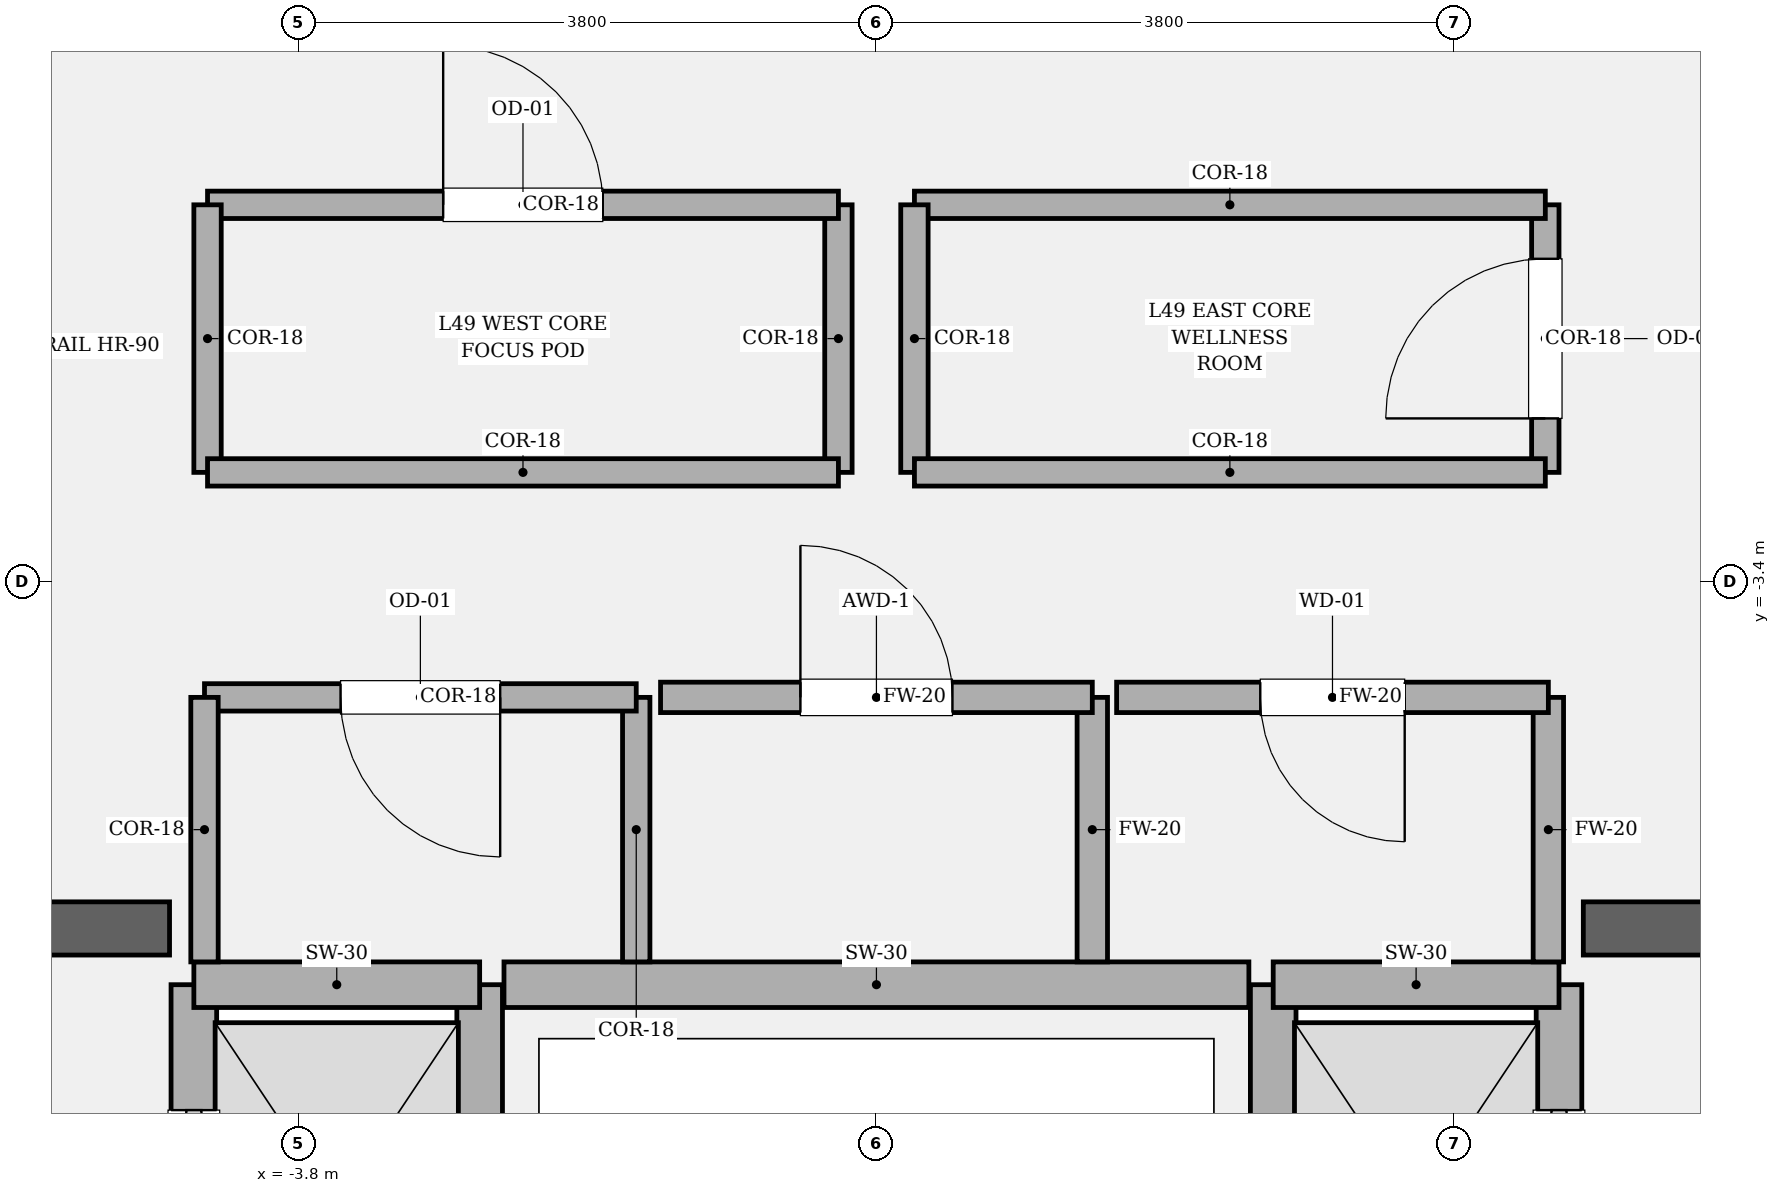
"""IFC4 building model, lengths in metres.
Left out: names, types, materials, properties, quantities, classifications, styles, units other than length and angle.
Written with IfcOpenShell. Run it as: python <this file> out.ifc"""

import sys

from ifc_helpers import new_model, si_unit, direction, frame, frame_2d, origin, place, context, subcontext, project, spatial, rectangle, extrude, element, fill, save


model = new_model("IFC4")
c1 = context("Model", 3, precision=1e-05, world=origin(), true_north=direction((0.0, 1.0)))
c2 = subcontext(c1, "Body", "Model", "MODEL_VIEW")
j1 = project(units=[si_unit("LENGTHUNIT", "METRE"), si_unit("PLANEANGLEUNIT", "RADIAN")], contexts=[c1])
p1 = place(None, origin())
s1 = spatial("IfcSite", under=j1, at=p1, CompositionType="ELEMENT")
p2 = place(p1, origin())
s2 = spatial("IfcBuilding", under=s1, at=p2, CompositionType="ELEMENT")
p3 = place(p2, frame((0.0, 0.0, 208.65)))
s3 = spatial("IfcBuildingStorey", under=s2, at=p3, CompositionType="ELEMENT", Elevation=208.65)
p4 = place(p3, frame((-9.875, -5.68, 0.0), z_axis=(0.0, 0.0, 1.0), x_axis=(1.0, 0.0, 0.0)))
e1 = element("IfcWall", 1, at=p4, inside=s3, PredefinedType="SOLIDWALL", context=c2, shape_type="SweptSolid", body=[
    extrude(rectangle(XDim=5.225, YDim=0.35, at=frame_2d((2.613, 0.0))), origin(), (0.0, 0.0, 1.0), 4.05),
])
p5 = place(p4, frame((1.335, 0.0, 0.0)))
e2 = element("IfcOpeningElement", 2, at=p5, cuts=e1, PredefinedType="OPENING", context=c2, shape_type="SweptSolid", body=[
    extrude(rectangle(XDim=1.18, YDim=2.2, at=frame_2d((0.59, 1.1))), frame((0.0, 0.185, 0.0), z_axis=(0.0, -1.0, 0.0), x_axis=(1.0, 0.0, 0.0)), (0.0, 0.0, 1.0), 0.37),
])
p6 = place(p3, frame((4.65, -5.68, 0.0), z_axis=(0.0, 0.0, 1.0), x_axis=(1.0, 0.0, 0.0)))
e3 = element("IfcWall", 3, at=p6, inside=s3, PredefinedType="SOLIDWALL", context=c2, shape_type="SweptSolid", body=[
    extrude(rectangle(XDim=5.225, YDim=0.35, at=frame_2d((2.613, 0.0))), origin(), (0.0, 0.0, 1.0), 4.05),
])
p7 = place(p6, frame((2.71, 0.0, 0.0)))
e4 = element("IfcOpeningElement", 4, at=p7, cuts=e3, PredefinedType="OPENING", context=c2, shape_type="SweptSolid", body=[
    extrude(rectangle(XDim=1.18, YDim=2.2, at=frame_2d((0.59, 1.1))), frame((0.0, 0.185, 0.0), z_axis=(0.0, -1.0, 0.0), x_axis=(1.0, 0.0, 0.0)), (0.0, 0.0, 1.0), 0.37),
])
p8 = place(p3, frame((-4.49, -8.82, 0.0), z_axis=(0.0, 0.0, 1.0), x_axis=(0.0, 1.0, 0.0)))
e5 = element("IfcWall", 5, at=p8, inside=s3, PredefinedType="SOLIDWALL", context=c2, shape_type="SweptSolid", body=[
    extrude(rectangle(XDim=2.77, YDim=0.3, at=frame_2d((1.385, 0.0))), origin(), (0.0, 0.0, 1.0), 3.83),
])
p9 = place(p8, frame((0.825, 0.0, 0.0)))
e6 = element("IfcOpeningElement", 6, at=p9, cuts=e5, PredefinedType="OPENING", context=c2, shape_type="SweptSolid", body=[
    extrude(rectangle(XDim=1.12, YDim=2.25, at=frame_2d((0.56, 1.125))), frame((0.0, 0.16, 0.0), z_axis=(0.0, -1.0, 0.0), x_axis=(1.0, 0.0, 0.0)), (0.0, 0.0, 1.0), 0.32),
])
p10 = place(p3, frame((-2.61, -8.82, 0.0), z_axis=(0.0, 0.0, 1.0), x_axis=(0.0, 1.0, 0.0)))
e7 = element("IfcWall", 7, at=p10, inside=s3, PredefinedType="SOLIDWALL", context=c2, shape_type="SweptSolid", body=[
    extrude(rectangle(XDim=2.77, YDim=0.3, at=frame_2d((1.385, 0.0))), origin(), (0.0, 0.0, 1.0), 3.83),
])
p11 = place(p3, frame((-4.49, -6.05, 0.0), z_axis=(0.0, 0.0, 1.0), x_axis=(1.0, 0.0, 0.0)))
e8 = element("IfcWall", 8, at=p11, inside=s3, PredefinedType="SOLIDWALL", context=c2, shape_type="SweptSolid", body=[
    extrude(rectangle(XDim=1.88, YDim=0.3, at=frame_2d((0.94, 0.0))), origin(), (0.0, 0.0, 1.0), 3.83),
])
p12 = place(p3, frame((4.49, -8.82, 0.0), z_axis=(0.0, 0.0, 1.0), x_axis=(0.0, 1.0, 0.0)))
e9 = element("IfcWall", 9, at=p12, inside=s3, PredefinedType="SOLIDWALL", context=c2, shape_type="SweptSolid", body=[
    extrude(rectangle(XDim=2.77, YDim=0.3, at=frame_2d((1.385, 0.0))), origin(), (0.0, 0.0, 1.0), 3.83),
])
p13 = place(p12, frame((0.825, 0.0, 0.0)))
e10 = element("IfcOpeningElement", 10, at=p13, cuts=e9, PredefinedType="OPENING", context=c2, shape_type="SweptSolid", body=[
    extrude(rectangle(XDim=1.12, YDim=2.25, at=frame_2d((0.56, 1.125))), frame((0.0, 0.16, 0.0), z_axis=(0.0, -1.0, 0.0), x_axis=(1.0, 0.0, 0.0)), (0.0, 0.0, 1.0), 0.32),
])
p14 = place(p3, frame((2.61, -8.82, 0.0), z_axis=(0.0, 0.0, 1.0), x_axis=(0.0, 1.0, 0.0)))
e11 = element("IfcWall", 11, at=p14, inside=s3, PredefinedType="SOLIDWALL", context=c2, shape_type="SweptSolid", body=[
    extrude(rectangle(XDim=2.77, YDim=0.3, at=frame_2d((1.385, 0.0))), origin(), (0.0, 0.0, 1.0), 3.83),
])
p15 = place(p3, frame((2.61, -6.05, 0.0), z_axis=(0.0, 0.0, 1.0), x_axis=(1.0, 0.0, 0.0)))
e12 = element("IfcWall", 12, at=p15, inside=s3, PredefinedType="SOLIDWALL", context=c2, shape_type="SweptSolid", body=[
    extrude(rectangle(XDim=1.88, YDim=0.3, at=frame_2d((0.94, 0.0))), origin(), (0.0, 0.0, 1.0), 3.83),
])
p16 = place(p3, frame((-2.45, -6.05, 0.0), z_axis=(0.0, 0.0, 1.0), x_axis=(1.0, 0.0, 0.0)))
e13 = element("IfcWall", 13, at=p16, inside=s3, PredefinedType="SOLIDWALL", context=c2, shape_type="SweptSolid", body=[
    extrude(rectangle(XDim=4.9, YDim=0.3, at=frame_2d((2.45, 0.0))), origin(), (0.0, 0.0, 1.0), 3.83),
])
p17 = place(p3, frame((-1.58, -5.9, 0.0), z_axis=(0.0, 0.0, 1.0), x_axis=(0.0, 1.0, 0.0)))
e14 = element("IfcWall", 14, at=p17, inside=s3, PredefinedType="PARTITIONING", context=c2, shape_type="SweptSolid", body=[
    extrude(rectangle(XDim=1.74, YDim=0.18, at=frame_2d((0.87, 0.0))), origin(), (0.0, 0.0, 1.0), 3.83),
])
p18 = place(p3, frame((-1.58, -4.16, 0.0), z_axis=(0.0, 0.0, 1.0), x_axis=(-1.0, 0.0, 0.0)))
e15 = element("IfcWall", 15, at=p18, inside=s3, PredefinedType="PARTITIONING", context=c2, shape_type="SweptSolid", body=[
    extrude(rectangle(XDim=2.84, YDim=0.18, at=frame_2d((1.42, 0.0))), origin(), (0.0, 0.0, 1.0), 3.83),
])
p19 = place(p18, frame((0.895, 0.0, 0.0)))
e16 = element("IfcOpeningElement", 16, at=p19, cuts=e15, PredefinedType="OPENING", context=c2, shape_type="SweptSolid", body=[
    extrude(rectangle(XDim=1.05, YDim=2.2, at=frame_2d((0.525, 1.1))), frame((0.0, 0.1, 0.0), z_axis=(0.0, -1.0, 0.0), x_axis=(1.0, 0.0, 0.0)), (0.0, 0.0, 1.0), 0.2),
])
p20 = place(p3, frame((-4.42, -4.16, 0.0), z_axis=(0.0, 0.0, 1.0), x_axis=(0.0, -1.0, 0.0)))
e17 = element("IfcWall", 17, at=p20, inside=s3, PredefinedType="PARTITIONING", context=c2, shape_type="SweptSolid", body=[
    extrude(rectangle(XDim=1.74, YDim=0.18, at=frame_2d((0.87, 0.0))), origin(), (0.0, 0.0, 1.0), 3.83),
])
p21 = place(p3, frame((1.42, -5.9, 0.0), z_axis=(0.0, 0.0, 1.0), x_axis=(0.0, 1.0, 0.0)))
e18 = element("IfcWall", 18, at=p21, inside=s3, PredefinedType="SOLIDWALL", context=c2, shape_type="SweptSolid", body=[
    extrude(rectangle(XDim=1.74, YDim=0.2, at=frame_2d((0.87, 0.0))), origin(), (0.0, 0.0, 1.0), 3.83),
])
p22 = place(p3, frame((1.42, -4.16, 0.0), z_axis=(0.0, 0.0, 1.0), x_axis=(-1.0, 0.0, 0.0)))
e19 = element("IfcWall", 19, at=p22, inside=s3, PredefinedType="SOLIDWALL", context=c2, shape_type="SweptSolid", body=[
    extrude(rectangle(XDim=2.84, YDim=0.2, at=frame_2d((1.42, 0.0))), origin(), (0.0, 0.0, 1.0), 3.83),
])
p23 = place(p22, frame((0.92, 0.0, 0.0)))
e20 = element("IfcOpeningElement", 20, at=p23, cuts=e19, PredefinedType="OPENING", context=c2, shape_type="SweptSolid", body=[
    extrude(rectangle(XDim=1.0, YDim=2.15, at=frame_2d((0.5, 1.075))), frame((0.0, 0.11, 0.0), z_axis=(0.0, -1.0, 0.0), x_axis=(1.0, 0.0, 0.0)), (0.0, 0.0, 1.0), 0.22),
])
p24 = place(p3, frame((4.42, -5.9, 0.0), z_axis=(0.0, 0.0, 1.0), x_axis=(0.0, 1.0, 0.0)))
e21 = element("IfcWall", 21, at=p24, inside=s3, PredefinedType="SOLIDWALL", context=c2, shape_type="SweptSolid", body=[
    extrude(rectangle(XDim=1.74, YDim=0.2, at=frame_2d((0.87, 0.0))), origin(), (0.0, 0.0, 1.0), 3.83),
])
p25 = place(p3, frame((4.42, -4.16, 0.0), z_axis=(0.0, 0.0, 1.0), x_axis=(-1.0, 0.0, 0.0)))
e22 = element("IfcWall", 22, at=p25, inside=s3, PredefinedType="SOLIDWALL", context=c2, shape_type="SweptSolid", body=[
    extrude(rectangle(XDim=2.84, YDim=0.2, at=frame_2d((1.42, 0.0))), origin(), (0.0, 0.0, 1.0), 3.83),
])
p26 = place(p25, frame((0.945, 0.0, 0.0)))
e23 = element("IfcOpeningElement", 23, at=p26, cuts=e22, PredefinedType="OPENING", context=c2, shape_type="SweptSolid", body=[
    extrude(rectangle(XDim=0.95, YDim=2.15, at=frame_2d((0.475, 1.075))), frame((0.0, 0.11, 0.0), z_axis=(0.0, -1.0, 0.0), x_axis=(1.0, 0.0, 0.0)), (0.0, 0.0, 1.0), 0.22),
])
p27 = place(p3, frame((-0.25, -2.68, 0.0), z_axis=(0.0, 0.0, 1.0), x_axis=(0.0, 1.0, 0.0)))
e24 = element("IfcWall", 24, at=p27, inside=s3, PredefinedType="PARTITIONING", context=c2, shape_type="SweptSolid", body=[
    extrude(rectangle(XDim=1.76, YDim=0.18, at=frame_2d((0.88, 0.0))), origin(), (0.0, 0.0, 1.0), 3.83),
])
p28 = place(p3, frame((-0.25, -0.92, 0.0), z_axis=(0.0, 0.0, 1.0), x_axis=(-1.0, 0.0, 0.0)))
e25 = element("IfcWall", 25, at=p28, inside=s3, PredefinedType="PARTITIONING", context=c2, shape_type="SweptSolid", body=[
    extrude(rectangle(XDim=4.15, YDim=0.18, at=frame_2d((2.075, 0.0))), origin(), (0.0, 0.0, 1.0), 3.83),
])
p29 = place(p28, frame((1.55, 0.0, 0.0)))
e26 = element("IfcOpeningElement", 26, at=p29, cuts=e25, PredefinedType="OPENING", context=c2, shape_type="SweptSolid", body=[
    extrude(rectangle(XDim=1.05, YDim=2.2, at=frame_2d((0.525, 1.1))), frame((0.0, 0.1, 0.0), z_axis=(0.0, -1.0, 0.0), x_axis=(1.0, 0.0, 0.0)), (0.0, 0.0, 1.0), 0.2),
])
p30 = place(p3, frame((-4.4, -0.92, 0.0), z_axis=(0.0, 0.0, 1.0), x_axis=(0.0, -1.0, 0.0)))
e27 = element("IfcWall", 27, at=p30, inside=s3, PredefinedType="PARTITIONING", context=c2, shape_type="SweptSolid", body=[
    extrude(rectangle(XDim=1.76, YDim=0.18, at=frame_2d((0.88, 0.0))), origin(), (0.0, 0.0, 1.0), 3.83),
])
p31 = place(p3, frame((-4.4, -2.68, 0.0), z_axis=(0.0, 0.0, 1.0), x_axis=(1.0, 0.0, 0.0)))
e28 = element("IfcWall", 28, at=p31, inside=s3, PredefinedType="PARTITIONING", context=c2, shape_type="SweptSolid", body=[
    extrude(rectangle(XDim=4.15, YDim=0.18, at=frame_2d((2.075, 0.0))), origin(), (0.0, 0.0, 1.0), 3.83),
])
p32 = place(p3, frame((4.4, -2.68, 0.0), z_axis=(0.0, 0.0, 1.0), x_axis=(0.0, 1.0, 0.0)))
e29 = element("IfcWall", 29, at=p32, inside=s3, PredefinedType="PARTITIONING", context=c2, shape_type="SweptSolid", body=[
    extrude(rectangle(XDim=1.76, YDim=0.18, at=frame_2d((0.88, 0.0))), origin(), (0.0, 0.0, 1.0), 3.83),
])
p33 = place(p32, frame((0.355, 0.0, 0.0)))
e30 = element("IfcOpeningElement", 30, at=p33, cuts=e29, PredefinedType="OPENING", context=c2, shape_type="SweptSolid", body=[
    extrude(rectangle(XDim=1.05, YDim=2.2, at=frame_2d((0.525, 1.1))), frame((0.0, 0.1, 0.0), z_axis=(0.0, -1.0, 0.0), x_axis=(1.0, 0.0, 0.0)), (0.0, 0.0, 1.0), 0.2),
])
p34 = place(p3, frame((4.4, -0.92, 0.0), z_axis=(0.0, 0.0, 1.0), x_axis=(-1.0, 0.0, 0.0)))
e31 = element("IfcWall", 31, at=p34, inside=s3, PredefinedType="PARTITIONING", context=c2, shape_type="SweptSolid", body=[
    extrude(rectangle(XDim=4.15, YDim=0.18, at=frame_2d((2.075, 0.0))), origin(), (0.0, 0.0, 1.0), 3.83),
])
p35 = place(p3, frame((0.25, -0.92, 0.0), z_axis=(0.0, 0.0, 1.0), x_axis=(0.0, -1.0, 0.0)))
e32 = element("IfcWall", 32, at=p35, inside=s3, PredefinedType="PARTITIONING", context=c2, shape_type="SweptSolid", body=[
    extrude(rectangle(XDim=1.76, YDim=0.18, at=frame_2d((0.88, 0.0))), origin(), (0.0, 0.0, 1.0), 3.83),
])
p36 = place(p3, frame((0.25, -2.68, 0.0), z_axis=(0.0, 0.0, 1.0), x_axis=(1.0, 0.0, 0.0)))
e33 = element("IfcWall", 33, at=p36, inside=s3, PredefinedType="PARTITIONING", context=c2, shape_type="SweptSolid", body=[
    extrude(rectangle(XDim=4.15, YDim=0.18, at=frame_2d((2.075, 0.0))), origin(), (0.0, 0.0, 1.0), 3.83),
])
p37 = place(p9, origin())
e34 = element("IfcDoor", 34, at=p37, inside=s3, OperationType="SLIDING_TO_LEFT", PredefinedType="DOOR", context=c2, shape_type="SweptSolid", body=[
    extrude(rectangle(XDim=1.12, YDim=2.25, at=frame_2d((0.56, 1.125))), frame((0.0, 0.025, 0.0), z_axis=(0.0, -1.0, 0.0), x_axis=(1.0, 0.0, 0.0)), (0.0, 0.0, 1.0), 0.05),
])
fill(e6, e34)
p38 = place(p13, origin())
e35 = element("IfcDoor", 35, at=p38, inside=s3, OperationType="SLIDING_TO_RIGHT", PredefinedType="DOOR", context=c2, shape_type="SweptSolid", body=[
    extrude(rectangle(XDim=1.12, YDim=2.25, at=frame_2d((0.56, 1.125))), frame((0.0, 0.025, 0.0), z_axis=(0.0, -1.0, 0.0), x_axis=(1.0, 0.0, 0.0)), (0.0, 0.0, 1.0), 0.05),
])
fill(e10, e35)
p39 = place(p19, origin())
e36 = element("IfcDoor", 36, at=p39, inside=s3, OperationType="SINGLE_SWING_LEFT", PredefinedType="DOOR", context=c2, shape_type="SweptSolid", body=[
    extrude(rectangle(XDim=1.05, YDim=2.2, at=frame_2d((0.525, 1.1))), frame((0.0, 0.025, 0.0), z_axis=(0.0, -1.0, 0.0), x_axis=(1.0, 0.0, 0.0)), (0.0, 0.0, 1.0), 0.05),
])
fill(e16, e36)
p40 = place(p23, origin())
e37 = element("IfcDoor", 37, at=p40, inside=s3, OperationType="SINGLE_SWING_RIGHT", PredefinedType="DOOR", context=c2, shape_type="SweptSolid", body=[
    extrude(rectangle(XDim=1.0, YDim=2.15, at=frame_2d((0.5, 1.075))), frame((0.0, 0.025, 0.0), z_axis=(0.0, -1.0, 0.0), x_axis=(1.0, 0.0, 0.0)), (0.0, 0.0, 1.0), 0.05),
])
fill(e20, e37)
p41 = place(p26, origin())
e38 = element("IfcDoor", 38, at=p41, inside=s3, OperationType="SINGLE_SWING_LEFT", PredefinedType="DOOR", context=c2, shape_type="SweptSolid", body=[
    extrude(rectangle(XDim=0.95, YDim=2.15, at=frame_2d((0.475, 1.075))), frame((0.0, 0.025, 0.0), z_axis=(0.0, -1.0, 0.0), x_axis=(1.0, 0.0, 0.0)), (0.0, 0.0, 1.0), 0.05),
])
fill(e23, e38)
p42 = place(p29, origin())
e39 = element("IfcDoor", 39, at=p42, inside=s3, OperationType="SINGLE_SWING_RIGHT", PredefinedType="DOOR", context=c2, shape_type="SweptSolid", body=[
    extrude(rectangle(XDim=1.05, YDim=2.2, at=frame_2d((0.525, 1.1))), frame((0.0, 0.025, 0.0), z_axis=(0.0, -1.0, 0.0), x_axis=(1.0, 0.0, 0.0)), (0.0, 0.0, 1.0), 0.05),
])
fill(e26, e39)
p43 = place(p33, origin())
e40 = element("IfcDoor", 40, at=p43, inside=s3, OperationType="SINGLE_SWING_LEFT", PredefinedType="DOOR", context=c2, shape_type="SweptSolid", body=[
    extrude(rectangle(XDim=1.05, YDim=2.2, at=frame_2d((0.525, 1.1))), frame((0.0, 0.025, 0.0), z_axis=(0.0, -1.0, 0.0), x_axis=(1.0, 0.0, 0.0)), (0.0, 0.0, 1.0), 0.05),
])
fill(e30, e40)
save(model, sys.argv[1])
